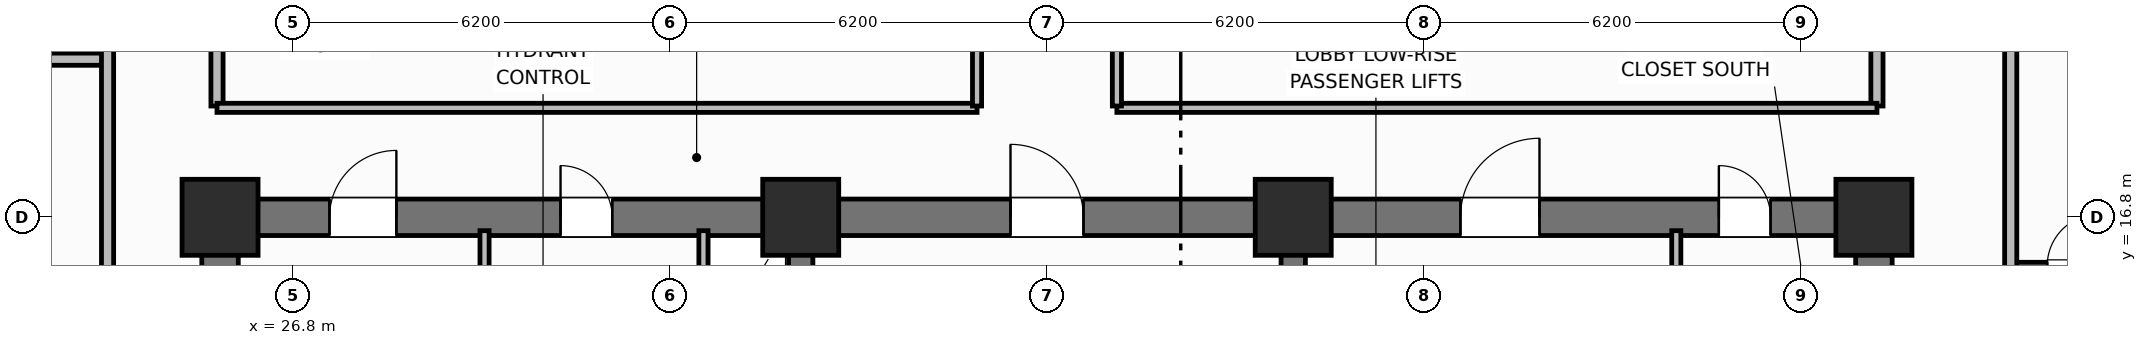
"""IFC4 building model, lengths in metres.
Left out: names, types, materials, properties, quantities, classifications, styles, units other than length and angle.
Written with IfcOpenShell. Run it as: python <this file> out.ifc"""

import sys

from ifc_helpers import new_model, si_unit, direction, frame, frame_2d, origin, origin_2d, place, context, subcontext, project, spatial, rectangle, extrude, element, fill, save


model = new_model("IFC4")
c1 = context("Model", 3, precision=1e-05, world=origin(), true_north=direction((0.0, 1.0)))
c2 = subcontext(c1, "Body", "Model", "MODEL_VIEW")
j1 = project(units=[si_unit("LENGTHUNIT", "METRE"), si_unit("PLANEANGLEUNIT", "RADIAN")], contexts=[c1])
p1 = place(None, origin())
s1 = spatial("IfcSite", under=j1, at=p1, CompositionType="ELEMENT")
p2 = place(p1, origin())
s2 = spatial("IfcBuilding", under=s1, at=p2, CompositionType="ELEMENT")
p3 = place(p2, frame((0.0, 0.0, 54.7)))
s3 = spatial("IfcBuildingStorey", under=s2, at=p3, CompositionType="ELEMENT", Elevation=54.7)
for number, where, z_axis, x_axis in (
    (1, (25.6, 10.9, 0.0), (0.0, 0.0, 1.0), (0.0, 1.0, 0.0)),
    (2, (52.8, 10.9, 0.0), (0.0, 0.0, 1.0), (0.0, 1.0, 0.0)),
):
    element("IfcWall", number, at=place(p3, frame(where, z_axis=z_axis, x_axis=x_axis)), inside=s3, PredefinedType="SHEAR", context=c2, shape_type="SweptSolid", body=[
        extrude(rectangle(XDim=5.6, YDim=0.6, at=frame_2d((2.8, 0.0))), origin(), (0.0, 0.0, 1.0), 3.7),
    ])
p4 = place(p3, frame((25.6, 16.8, 0.0), z_axis=(0.0, 0.0, 1.0), x_axis=(1.0, 0.0, 0.0)))
e3 = element("IfcWall", 3, at=p4, inside=s3, PredefinedType="SHEAR", context=c2, shape_type="SweptSolid", body=[
    extrude(rectangle(XDim=27.2, YDim=0.6, at=frame_2d((13.6, 0.0))), origin(), (0.0, 0.0, 1.0), 3.7),
])
p5 = place(p4, frame((1.8, 0.0, 0.0)))
e4 = element("IfcOpeningElement", 4, at=p5, cuts=e3, PredefinedType="OPENING", context=c2, shape_type="SweptSolid", body=[
    extrude(rectangle(XDim=1.1, YDim=2.15, at=frame_2d((0.55, 1.075))), frame((0.0, 0.31, 0.0), z_axis=(0.0, -1.0, 0.0), x_axis=(1.0, 0.0, 0.0)), (0.0, 0.0, 1.0), 0.62),
])
p6 = place(p4, frame((5.6, 0.0, 0.0)))
e5 = element("IfcOpeningElement", 5, at=p6, cuts=e3, PredefinedType="OPENING", context=c2, shape_type="SweptSolid", body=[
    extrude(rectangle(XDim=0.85, YDim=2.1, at=frame_2d((0.425, 1.05))), frame((0.0, 0.31, 0.0), z_axis=(0.0, -1.0, 0.0), x_axis=(1.0, 0.0, 0.0)), (0.0, 0.0, 1.0), 0.62),
])
p7 = place(p4, frame((13.0, 0.0, 0.0)))
e6 = element("IfcOpeningElement", 6, at=p7, cuts=e3, PredefinedType="OPENING", context=c2, shape_type="SweptSolid", body=[
    extrude(rectangle(XDim=1.2, YDim=2.15, at=frame_2d((0.6, 1.075))), frame((0.0, 0.31, 0.0), z_axis=(0.0, -1.0, 0.0), x_axis=(1.0, 0.0, 0.0)), (0.0, 0.0, 1.0), 0.62),
])
p8 = place(p4, frame((20.4, 0.0, 0.0)))
e7 = element("IfcOpeningElement", 7, at=p8, cuts=e3, PredefinedType="OPENING", context=c2, shape_type="SweptSolid", body=[
    extrude(rectangle(XDim=1.3, YDim=2.2, at=frame_2d((0.65, 1.1))), frame((0.0, 0.31, 0.0), z_axis=(0.0, -1.0, 0.0), x_axis=(1.0, 0.0, 0.0)), (0.0, 0.0, 1.0), 0.62),
])
p9 = place(p4, frame((24.65, 0.0, 0.0)))
e8 = element("IfcOpeningElement", 8, at=p9, cuts=e3, PredefinedType="OPENING", context=c2, shape_type="SweptSolid", body=[
    extrude(rectangle(XDim=0.85, YDim=2.1, at=frame_2d((0.425, 1.05))), frame((0.0, 0.31, 0.0), z_axis=(0.0, -1.0, 0.0), x_axis=(1.0, 0.0, 0.0)), (0.0, 0.0, 1.0), 0.62),
])
for number, where, z_axis, x_axis in (
    (9, (35.15, 10.9, 0.0), (0.0, 0.0, 1.0), (0.0, 1.0, 0.0)),
    (10, (43.25, 10.9, 0.0), (0.0, 0.0, 1.0), (0.0, 1.0, 0.0)),
):
    element("IfcWall", number, at=place(p3, frame(where, z_axis=z_axis, x_axis=x_axis)), inside=s3, PredefinedType="SHEAR", context=c2, shape_type="SweptSolid", body=[
        extrude(rectangle(XDim=5.6, YDim=0.4, at=frame_2d((2.8, 0.0))), origin(), (0.0, 0.0, 1.0), 3.7),
    ])
for number, where, z_axis, x_axis in (
    (11, (25.6, 16.8, 0.0), (0.0, 0.0, 1.0), (1.0, 0.0, 0.0)),
    (12, (35.15, 16.8, 0.0), (0.0, 0.0, 1.0), (1.0, 0.0, 0.0)),
    (13, (43.25, 16.8, 0.0), (0.0, 0.0, 1.0), (1.0, 0.0, 0.0)),
    (14, (52.8, 16.8, 0.0), (0.0, 0.0, 1.0), (1.0, 0.0, 0.0)),
):
    element("IfcColumn", number, at=place(p3, frame(where, z_axis=z_axis, x_axis=x_axis)), inside=s3, PredefinedType="COLUMN", context=c2, shape_type="SweptSolid", body=[
        extrude(rectangle(XDim=1.25, YDim=1.25, at=origin_2d()), origin(), (0.0, 0.0, 1.0), 3.7),
    ])
p10 = place(p3, frame((29.95, 14.5, 0.0), z_axis=(0.0, 0.0, 1.0), x_axis=(0.0, 1.0, 0.0)))
e15 = element("IfcWall", 15, at=p10, inside=s3, PredefinedType="PARTITIONING", context=c2, shape_type="SweptSolid", body=[
    extrude(rectangle(XDim=2.08, YDim=0.15, at=frame_2d((1.04, 0.0))), origin(), (0.0, 0.0, 1.0), 2.53),
])
p11 = place(p3, frame((33.55, 14.5, 0.0), z_axis=(0.0, 0.0, 1.0), x_axis=(0.0, 1.0, 0.0)))
e16 = element("IfcWall", 16, at=p11, inside=s3, PredefinedType="PARTITIONING", context=c2, shape_type="SweptSolid", body=[
    extrude(rectangle(XDim=2.08, YDim=0.15, at=frame_2d((1.04, 0.0))), origin(), (0.0, 0.0, 1.0), 2.53),
])
p12 = place(p11, frame((0.55, 0.0, 0.0)))
e17 = element("IfcOpeningElement", 17, at=p12, cuts=e16, PredefinedType="OPENING", context=c2, shape_type="SweptSolid", body=[
    extrude(rectangle(XDim=0.85, YDim=2.05, at=frame_2d((0.425, 1.025))), frame((0.0, 0.085, 0.0), z_axis=(0.0, -1.0, 0.0), x_axis=(1.0, 0.0, 0.0)), (0.0, 0.0, 1.0), 0.17),
])
p13 = place(p3, frame((49.55, 13.7, 0.0), z_axis=(0.0, 0.0, 1.0), x_axis=(0.0, 1.0, 0.0)))
e18 = element("IfcWall", 18, at=p13, inside=s3, PredefinedType="PARTITIONING", context=c2, shape_type="SweptSolid", body=[
    extrude(rectangle(XDim=2.88, YDim=0.15, at=frame_2d((1.44, 0.0))), origin(), (0.0, 0.0, 1.0), 2.53),
])
for number, where, z_axis, x_axis in (
    (19, (25.55, 18.63, 0.0), (0.0, 0.0, 1.0), (0.0, 1.0, 0.0)),
    (20, (52.85, 18.63, 0.0), (0.0, 0.0, 1.0), (0.0, 1.0, 0.0)),
):
    element("IfcWall", number, at=place(p3, frame(where, z_axis=z_axis, x_axis=x_axis)), inside=s3, PredefinedType="PARTITIONING", context=c2, shape_type="SweptSolid", body=[
        extrude(rectangle(XDim=19.14, YDim=0.2, at=frame_2d((9.57, 0.0))), origin(), (0.0, 0.0, 1.0), 2.53),
    ])
for number, where, z_axis, x_axis in (
    (21, (25.55, 18.6, 0.0), (0.0, 0.0, 1.0), (1.0, 0.0, 0.0)),
    (22, (40.35, 18.6, 0.0), (0.0, 0.0, 1.0), (1.0, 0.0, 0.0)),
):
    element("IfcWall", number, at=place(p3, frame(where, z_axis=z_axis, x_axis=x_axis)), inside=s3, PredefinedType="PARTITIONING", context=c2, shape_type="SweptSolid", body=[
        extrude(rectangle(XDim=12.5, YDim=0.15, at=frame_2d((6.25, 0.0))), origin(), (0.0, 0.0, 1.0), 2.53),
    ])
p14 = place(p3, frame((38.05, 18.63, 0.0), z_axis=(0.0, 0.0, 1.0), x_axis=(0.0, 1.0, 0.0)))
e23 = element("IfcWall", 23, at=p14, inside=s3, PredefinedType="PARTITIONING", context=c2, shape_type="SweptSolid", body=[
    extrude(rectangle(XDim=19.14, YDim=0.15, at=frame_2d((9.57, 0.0))), origin(), (0.0, 0.0, 1.0), 2.53),
])
p15 = place(p14, frame((2.2, 0.0, 0.0)))
e24 = element("IfcOpeningElement", 24, at=p15, cuts=e23, PredefinedType="OPENING", context=c2, shape_type="SweptSolid", body=[
    extrude(rectangle(XDim=1.0, YDim=2.15, at=frame_2d((0.5, 1.075))), frame((0.0, 0.085, 0.0), z_axis=(0.0, -1.0, 0.0), x_axis=(1.0, 0.0, 0.0)), (0.0, 0.0, 1.0), 0.17),
])
p16 = place(p14, frame((10.604, 0.0, 0.0)))
e25 = element("IfcOpeningElement", 25, at=p16, cuts=e23, PredefinedType="OPENING", context=c2, shape_type="SweptSolid", body=[
    extrude(rectangle(XDim=1.0, YDim=2.15, at=frame_2d((0.5, 1.075))), frame((0.0, 0.085, 0.0), z_axis=(0.0, -1.0, 0.0), x_axis=(1.0, 0.0, 0.0)), (0.0, 0.0, 1.0), 0.17),
])
p17 = place(p3, frame((40.35, 18.63, 0.0), z_axis=(0.0, 0.0, 1.0), x_axis=(0.0, 1.0, 0.0)))
e26 = element("IfcWall", 26, at=p17, inside=s3, PredefinedType="PARTITIONING", context=c2, shape_type="SweptSolid", body=[
    extrude(rectangle(XDim=19.14, YDim=0.15, at=frame_2d((9.57, 0.0))), origin(), (0.0, 0.0, 1.0), 2.53),
])
p18 = place(p17, frame((2.2, 0.0, 0.0)))
e27 = element("IfcOpeningElement", 27, at=p18, cuts=e26, PredefinedType="OPENING", context=c2, shape_type="SweptSolid", body=[
    extrude(rectangle(XDim=1.0, YDim=2.15, at=frame_2d((0.5, 1.075))), frame((0.0, 0.085, 0.0), z_axis=(0.0, -1.0, 0.0), x_axis=(1.0, 0.0, 0.0)), (0.0, 0.0, 1.0), 0.17),
])
p19 = place(p17, frame((10.604, 0.0, 0.0)))
e28 = element("IfcOpeningElement", 28, at=p19, cuts=e26, PredefinedType="OPENING", context=c2, shape_type="SweptSolid", body=[
    extrude(rectangle(XDim=0.9, YDim=2.1, at=frame_2d((0.45, 1.05))), frame((0.0, 0.085, 0.0), z_axis=(0.0, -1.0, 0.0), x_axis=(1.0, 0.0, 0.0)), (0.0, 0.0, 1.0), 0.17),
])
p20 = place(p3, frame((14.57, 19.4, 0.0), z_axis=(0.0, 0.0, 1.0), x_axis=(1.0, 0.0, 0.0)))
e29 = element("IfcWall", 29, at=p20, inside=s3, PredefinedType="PARTITIONING", context=c2, shape_type="SweptSolid", body=[
    extrude(rectangle(XDim=9.18, YDim=0.2, at=frame_2d((4.59, 0.0))), origin(), (0.0, 0.0, 1.0), 2.53),
])
p21 = place(p3, frame((23.75, 10.6, 0.0), z_axis=(0.0, 0.0, 1.0), x_axis=(0.0, 1.0, 0.0)))
e30 = element("IfcWall", 30, at=p21, inside=s3, PredefinedType="PARTITIONING", context=c2, shape_type="SweptSolid", body=[
    extrude(rectangle(XDim=35.2, YDim=0.2, at=frame_2d((17.6, 0.0))), origin(), (0.0, 0.0, 1.0), 2.53),
])
p22 = place(p21, frame((2.65, 0.0, 0.0)))
e31 = element("IfcOpeningElement", 31, at=p22, cuts=e30, PredefinedType="OPENING", context=c2, shape_type="SweptSolid", body=[
    extrude(rectangle(XDim=1.0, YDim=2.15, at=frame_2d((0.5, 1.075))), frame((0.0, 0.11, 0.0), z_axis=(0.0, -1.0, 0.0), x_axis=(1.0, 0.0, 0.0)), (0.0, 0.0, 1.0), 0.22),
])
p23 = place(p21, frame((10.81, 0.0, 0.0)))
e32 = element("IfcOpeningElement", 32, at=p23, cuts=e30, PredefinedType="OPENING", context=c2, shape_type="SweptSolid", body=[
    extrude(rectangle(XDim=1.0, YDim=2.15, at=frame_2d((0.5, 1.075))), frame((0.0, 0.11, 0.0), z_axis=(0.0, -1.0, 0.0), x_axis=(1.0, 0.0, 0.0)), (0.0, 0.0, 1.0), 0.22),
])
p24 = place(p21, frame((19.54, 0.0, 0.0)))
e33 = element("IfcOpeningElement", 33, at=p24, cuts=e30, PredefinedType="OPENING", context=c2, shape_type="SweptSolid", body=[
    extrude(rectangle(XDim=1.0, YDim=2.15, at=frame_2d((0.5, 1.075))), frame((0.0, 0.11, 0.0), z_axis=(0.0, -1.0, 0.0), x_axis=(1.0, 0.0, 0.0)), (0.0, 0.0, 1.0), 0.22),
])
p25 = place(p21, frame((26.95, 0.0, 0.0)))
e34 = element("IfcOpeningElement", 34, at=p25, cuts=e30, PredefinedType="OPENING", context=c2, shape_type="SweptSolid", body=[
    extrude(rectangle(XDim=1.0, YDim=2.15, at=frame_2d((0.5, 1.075))), frame((0.0, 0.11, 0.0), z_axis=(0.0, -1.0, 0.0), x_axis=(1.0, 0.0, 0.0)), (0.0, 0.0, 1.0), 0.22),
])
p26 = place(p3, frame((55.05, 16.0, 0.0), z_axis=(0.0, 0.0, 1.0), x_axis=(1.0, 0.0, 0.0)))
e35 = element("IfcWall", 35, at=p26, inside=s3, PredefinedType="PARTITIONING", context=c2, shape_type="SweptSolid", body=[
    extrude(rectangle(XDim=2.25, YDim=0.12, at=frame_2d((1.125, 0.0))), origin(), (0.0, 0.0, 1.0), 2.53),
])
p27 = place(p26, frame((0.6, 0.0, 0.0)))
e36 = element("IfcOpeningElement", 36, at=p27, cuts=e35, PredefinedType="OPENING", context=c2, shape_type="SweptSolid", body=[
    extrude(rectangle(XDim=0.85, YDim=2.1, at=frame_2d((0.425, 1.05))), frame((0.0, 0.07, 0.0), z_axis=(0.0, -1.0, 0.0), x_axis=(1.0, 0.0, 0.0)), (0.0, 0.0, 1.0), 0.14),
])
p28 = place(p3, frame((55.05, 10.6, 0.0), z_axis=(0.0, 0.0, 1.0), x_axis=(0.0, 1.0, 0.0)))
e37 = element("IfcWall", 37, at=p28, inside=s3, PredefinedType="PARTITIONING", context=c2, shape_type="SweptSolid", body=[
    extrude(rectangle(XDim=35.2, YDim=0.2, at=frame_2d((17.6, 0.0))), origin(), (0.0, 0.0, 1.0), 2.53),
])
p29 = place(p28, frame((2.65, 0.0, 0.0)))
e38 = element("IfcOpeningElement", 38, at=p29, cuts=e37, PredefinedType="OPENING", context=c2, shape_type="SweptSolid", body=[
    extrude(rectangle(XDim=1.0, YDim=2.15, at=frame_2d((0.5, 1.075))), frame((0.0, 0.11, 0.0), z_axis=(0.0, -1.0, 0.0), x_axis=(1.0, 0.0, 0.0)), (0.0, 0.0, 1.0), 0.22),
])
p30 = place(p28, frame((22.75, 0.0, 0.0)))
e39 = element("IfcOpeningElement", 39, at=p30, cuts=e37, PredefinedType="OPENING", context=c2, shape_type="SweptSolid", body=[
    extrude(rectangle(XDim=1.0, YDim=2.15, at=frame_2d((0.5, 1.075))), frame((0.0, 0.11, 0.0), z_axis=(0.0, -1.0, 0.0), x_axis=(1.0, 0.0, 0.0)), (0.0, 0.0, 1.0), 0.22),
])
p31 = place(p27, origin())
e40 = element("IfcDoor", 40, at=p31, inside=s3, OperationType="SINGLE_SWING_RIGHT", PredefinedType="DOOR", context=c2, shape_type="SweptSolid", body=[
    extrude(rectangle(XDim=0.85, YDim=2.1, at=frame_2d((0.425, 1.05))), frame((0.0, 0.025, 0.0), z_axis=(0.0, -1.0, 0.0), x_axis=(1.0, 0.0, 0.0)), (0.0, 0.0, 1.0), 0.05),
])
fill(e36, e40)
p32 = place(p5, origin())
e41 = element("IfcDoor", 41, at=p32, inside=s3, OperationType="SINGLE_SWING_RIGHT", PredefinedType="DOOR", context=c2, shape_type="SweptSolid", body=[
    extrude(rectangle(XDim=1.1, YDim=2.15, at=frame_2d((0.55, 1.075))), frame((0.0, 0.025, 0.0), z_axis=(0.0, -1.0, 0.0), x_axis=(1.0, 0.0, 0.0)), (0.0, 0.0, 1.0), 0.05),
])
fill(e4, e41)
p33 = place(p6, origin())
e42 = element("IfcDoor", 42, at=p33, inside=s3, OperationType="SINGLE_SWING_LEFT", PredefinedType="DOOR", context=c2, shape_type="SweptSolid", body=[
    extrude(rectangle(XDim=0.85, YDim=2.1, at=frame_2d((0.425, 1.05))), frame((0.0, 0.025, 0.0), z_axis=(0.0, -1.0, 0.0), x_axis=(1.0, 0.0, 0.0)), (0.0, 0.0, 1.0), 0.05),
])
fill(e5, e42)
p34 = place(p7, origin())
e43 = element("IfcDoor", 43, at=p34, inside=s3, OperationType="SINGLE_SWING_LEFT", PredefinedType="DOOR", context=c2, shape_type="SweptSolid", body=[
    extrude(rectangle(XDim=1.2, YDim=2.15, at=frame_2d((0.6, 1.075))), frame((0.0, 0.025, 0.0), z_axis=(0.0, -1.0, 0.0), x_axis=(1.0, 0.0, 0.0)), (0.0, 0.0, 1.0), 0.05),
])
fill(e6, e43)
p35 = place(p8, origin())
e44 = element("IfcDoor", 44, at=p35, inside=s3, OperationType="SINGLE_SWING_RIGHT", PredefinedType="DOOR", context=c2, shape_type="SweptSolid", body=[
    extrude(rectangle(XDim=1.3, YDim=2.2, at=frame_2d((0.65, 1.1))), frame((0.0, 0.025, 0.0), z_axis=(0.0, -1.0, 0.0), x_axis=(1.0, 0.0, 0.0)), (0.0, 0.0, 1.0), 0.05),
])
fill(e7, e44)
p36 = place(p9, origin())
e45 = element("IfcDoor", 45, at=p36, inside=s3, OperationType="SINGLE_SWING_LEFT", PredefinedType="DOOR", context=c2, shape_type="SweptSolid", body=[
    extrude(rectangle(XDim=0.85, YDim=2.1, at=frame_2d((0.425, 1.05))), frame((0.0, 0.025, 0.0), z_axis=(0.0, -1.0, 0.0), x_axis=(1.0, 0.0, 0.0)), (0.0, 0.0, 1.0), 0.05),
])
fill(e8, e45)
save(model, sys.argv[1])
